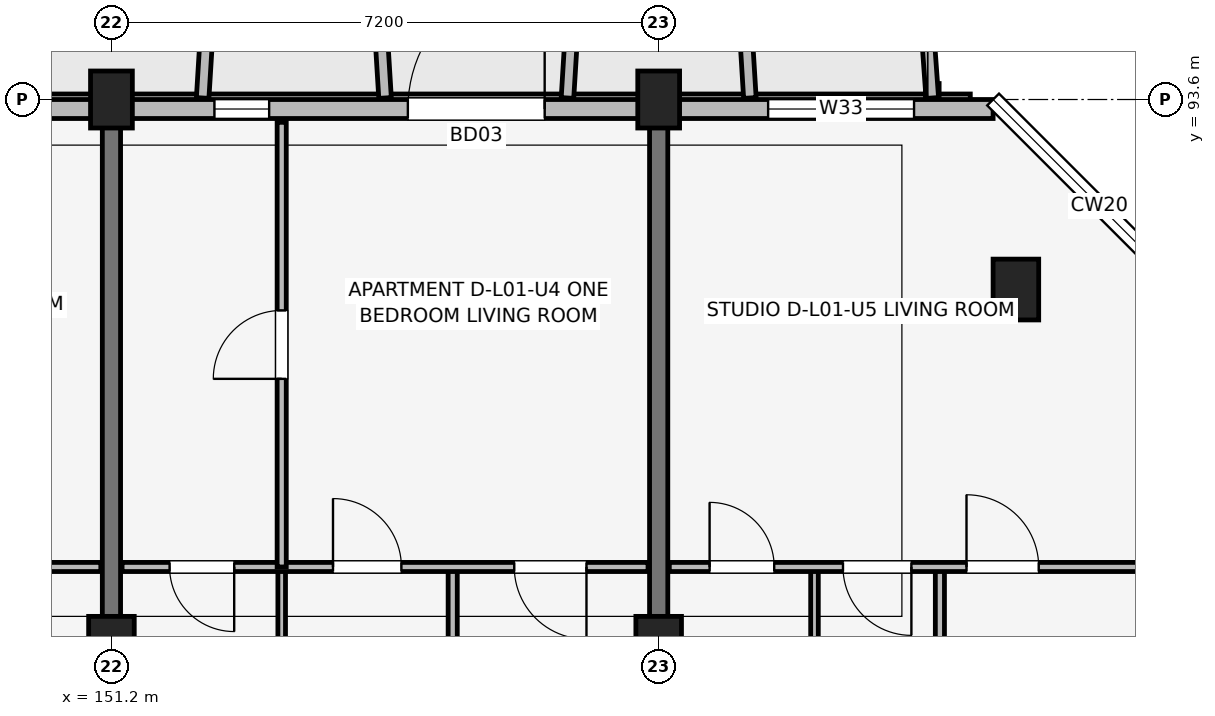
"""IFC4 building model, lengths in metres.
Left out: names, types, materials, properties, quantities, classifications, styles, units other than length and angle.
Written with IfcOpenShell. Run it as: python <this file> out.ifc"""

import sys

from ifc_helpers import new_model, si_unit, direction, frame, frame_2d, origin, origin_2d, place, context, subcontext, project, spatial, rectangle, extrude, element, fill, save


model = new_model("IFC4")
c1 = context("Model", 3, precision=1e-05, world=origin(), true_north=direction((0.0, 1.0)))
c2 = subcontext(c1, "Body", "Model", "MODEL_VIEW")
j1 = project(units=[si_unit("LENGTHUNIT", "METRE"), si_unit("PLANEANGLEUNIT", "RADIAN")], contexts=[c1])
p1 = place(None, origin())
s1 = spatial("IfcSite", under=j1, at=p1, CompositionType="ELEMENT")
p2 = place(p1, origin())
s2 = spatial("IfcBuilding", under=s1, at=p2, CompositionType="ELEMENT")
p3 = place(p2, frame((0.0, 0.0, 4.5)))
s3 = spatial("IfcBuildingStorey", under=s2, at=p3, CompositionType="ELEMENT", Elevation=4.5)
p4 = place(p3, frame((151.2, 86.4, 0.0), z_axis=(0.0, 0.0, 1.0), x_axis=(1.0, 0.0, 0.0)))
e1 = element("IfcColumn", 1, at=p4, inside=s3, PredefinedType="COLUMN", context=c2, shape_type="SweptSolid", body=[
    extrude(rectangle(XDim=0.6, YDim=0.8, at=origin_2d()), origin(), (0.0, 0.0, 1.0), 4.2),
])
p5 = place(p3, frame((151.2, 93.6, 0.0), z_axis=(0.0, 0.0, 1.0), x_axis=(1.0, 0.0, 0.0)))
e2 = element("IfcColumn", 2, at=p5, inside=s3, PredefinedType="COLUMN", context=c2, shape_type="SweptSolid", body=[
    extrude(rectangle(XDim=0.55, YDim=0.75, at=origin_2d()), origin(), (0.0, 0.0, 1.0), 4.2),
])
p6 = place(p3, frame((158.4, 86.4, 0.0), z_axis=(0.0, 0.0, 1.0), x_axis=(1.0, 0.0, 0.0)))
e3 = element("IfcColumn", 3, at=p6, inside=s3, PredefinedType="COLUMN", context=c2, shape_type="SweptSolid", body=[
    extrude(rectangle(XDim=0.6, YDim=0.8, at=origin_2d()), origin(), (0.0, 0.0, 1.0), 4.2),
])
p7 = place(p3, frame((158.4, 93.6, 0.0), z_axis=(0.0, 0.0, 1.0), x_axis=(1.0, 0.0, 0.0)))
e4 = element("IfcColumn", 4, at=p7, inside=s3, PredefinedType="COLUMN", context=c2, shape_type="SweptSolid", body=[
    extrude(rectangle(XDim=0.55, YDim=0.75, at=origin_2d()), origin(), (0.0, 0.0, 1.0), 4.2),
])
p8 = place(p3, frame((163.1, 91.1, 0.0), z_axis=(0.0, 0.0, 1.0), x_axis=(1.0, 0.0, 0.0)))
e5 = element("IfcColumn", 5, at=p8, inside=s3, PredefinedType="COLUMN", context=c2, shape_type="SweptSolid", body=[
    extrude(rectangle(XDim=0.6, YDim=0.8, at=origin_2d()), origin(), (0.0, 0.0, 1.0), 4.2),
])
for number, where, z_axis, x_axis in (
    (6, (151.2, 83.85, 0.0), (0.0, 0.0, 1.0), (0.0, 1.0, 0.0)),
    (7, (158.4, 83.85, 0.0), (0.0, 0.0, 1.0), (0.0, 1.0, 0.0)),
):
    element("IfcWall", number, at=place(p3, frame(where, z_axis=z_axis, x_axis=x_axis)), inside=s3, PredefinedType="SHEAR", context=c2, shape_type="SweptSolid", body=[
        extrude(rectangle(XDim=9.4, YDim=0.24, at=frame_2d((4.7, 0.0))), origin(), (0.0, 0.0, 1.0), 4.2),
    ])
p9 = place(p3, frame((162.8, 93.475, 0.0), z_axis=(0.0, 0.0, 1.0), x_axis=(-1.0, 0.0, 0.0)))
e8 = element("IfcWall", 8, at=p9, inside=s3, PredefinedType="SOLIDWALL", context=c2, shape_type="SweptSolid", body=[
    extrude(rectangle(XDim=30.4, YDim=0.25, at=frame_2d((15.2, 0.0))), origin(), (0.0, 0.0, 1.0), 3.48),
])
p10 = place(p9, frame((21.95, 0.0, 0.0), z_axis=(0.0, 0.0, 1.0), x_axis=(-1.0, 0.0, 0.0)))
e9 = element("IfcOpeningElement", 9, at=p10, cuts=e8, PredefinedType="OPENING", context=c2, shape_type="SweptSolid", body=[
    extrude(rectangle(XDim=1.5, YDim=2.15, at=frame_2d((0.75, 1.075))), frame((0.0, 0.135, 0.0), z_axis=(0.0, -1.0, 0.0), x_axis=(1.0, 0.0, 0.0)), (0.0, 0.0, 1.0), 0.27),
])
p11 = place(p9, frame((7.7, 0.0, 0.0), z_axis=(0.0, 0.0, 1.0), x_axis=(-1.0, 0.0, 0.0)))
e10 = element("IfcOpeningElement", 10, at=p11, cuts=e8, PredefinedType="OPENING", context=c2, shape_type="SweptSolid", body=[
    extrude(rectangle(XDim=1.8, YDim=2.15, at=frame_2d((0.9, 1.075))), frame((0.0, 0.135, 0.0), z_axis=(0.0, -1.0, 0.0), x_axis=(1.0, 0.0, 0.0)), (0.0, 0.0, 1.0), 0.27),
])
p12 = place(p9, frame((27.765, 0.0, 0.75)))
e11 = element("IfcOpeningElement", 11, at=p12, cuts=e8, PredefinedType="OPENING", context=c2, shape_type="SweptSolid", body=[
    extrude(rectangle(XDim=1.1, YDim=1.5, at=frame_2d((0.55, 0.75))), frame((0.0, 0.135, 0.0), z_axis=(0.0, -1.0, 0.0), x_axis=(1.0, 0.0, 0.0)), (0.0, 0.0, 1.0), 0.27),
])
p13 = place(p9, frame((23.925, 0.0, 0.75)))
e12 = element("IfcOpeningElement", 12, at=p13, cuts=e8, PredefinedType="OPENING", context=c2, shape_type="SweptSolid", body=[
    extrude(rectangle(XDim=0.72, YDim=1.35, at=frame_2d((0.36, 0.675))), frame((0.0, 0.135, 0.0), z_axis=(0.0, -1.0, 0.0), x_axis=(1.0, 0.0, 0.0)), (0.0, 0.0, 1.0), 0.27),
])
p14 = place(p9, frame((15.325, 0.0, 0.7)))
e13 = element("IfcOpeningElement", 13, at=p14, cuts=e8, PredefinedType="OPENING", context=c2, shape_type="SweptSolid", body=[
    extrude(rectangle(XDim=2.15, YDim=1.65, at=frame_2d((1.075, 0.825))), frame((0.0, 0.135, 0.0), z_axis=(0.0, -1.0, 0.0), x_axis=(1.0, 0.0, 0.0)), (0.0, 0.0, 1.0), 0.27),
])
p15 = place(p9, frame((9.525, 0.0, 0.75)))
e14 = element("IfcOpeningElement", 14, at=p15, cuts=e8, PredefinedType="OPENING", context=c2, shape_type="SweptSolid", body=[
    extrude(rectangle(XDim=0.72, YDim=1.35, at=frame_2d((0.36, 0.675))), frame((0.0, 0.135, 0.0), z_axis=(0.0, -1.0, 0.0), x_axis=(1.0, 0.0, 0.0)), (0.0, 0.0, 1.0), 0.27),
])
p16 = place(p9, frame((1.04, 0.0, 0.7)))
e15 = element("IfcOpeningElement", 15, at=p16, cuts=e8, PredefinedType="OPENING", context=c2, shape_type="SweptSolid", body=[
    extrude(rectangle(XDim=1.92, YDim=1.72, at=frame_2d((0.96, 0.86))), frame((0.0, 0.135, 0.0), z_axis=(0.0, -1.0, 0.0), x_axis=(1.0, 0.0, 0.0)), (0.0, 0.0, 1.0), 0.27),
])
for number, where, z_axis, x_axis in (
    (16, (152.4, 93.62, 0.0), (0.0, 0.0, 1.0), (0.061, 0.998, 0.0)),
    (17, (154.8, 93.62, 0.0), (0.0, 0.0, 1.0), (-0.061, 0.998, 0.0)),
    (18, (157.2, 93.62, 0.0), (0.0, 0.0, 1.0), (0.061, 0.998, 0.0)),
):
    element("IfcWall", number, at=place(p3, frame(where, z_axis=z_axis, x_axis=x_axis)), inside=s3, PredefinedType="ELEMENTEDWALL", context=c2, shape_type="SweptSolid", body=[
        extrude(rectangle(XDim=1.964, YDim=0.165, at=frame_2d((0.982, 0.0))), origin(), (0.0, 0.0, 1.0), 3.58),
    ])
p17 = place(p3, frame((159.6, 93.62, 0.0), z_axis=(0.0, 0.0, 1.0), x_axis=(-0.061170732449, 0.998127317276, 0.0)))
e19 = element("IfcWall", 19, at=p17, inside=s3, PredefinedType="ELEMENTEDWALL", context=c2, shape_type="SweptSolid", body=[
    extrude(rectangle(XDim=1.964, YDim=0.165, at=frame_2d((0.982, 0.0))), origin(), (0.0, 0.0, 1.0), 4.0),
])
p18 = place(p3, frame((162.0, 93.62, 0.0), z_axis=(0.0, 0.0, 1.0), x_axis=(-0.071194071069, 0.997462482625, 0.0)))
e20 = element("IfcWall", 20, at=p18, inside=s3, PredefinedType="ELEMENTEDWALL", context=c2, shape_type="SweptSolid", body=[
    extrude(rectangle(XDim=1.965, YDim=0.165, at=frame_2d((0.982, 0.0))), origin(), (0.0, 0.0, 1.0), 4.0),
])
p19 = place(p3, frame((144.14, 87.45, 0.0), z_axis=(0.0, 0.0, 1.0), x_axis=(1.0, 0.0, 0.0)))
e21 = element("IfcWall", 21, at=p19, inside=s3, PredefinedType="PARTITIONING", context=c2, shape_type="SweptSolid", body=[
    extrude(rectangle(XDim=6.92, YDim=0.12, at=frame_2d((3.46, 0.0))), origin(), (0.0, 0.0, 1.0), 3.25),
])
p20 = place(p19, frame((1.475, 0.0, 0.0), z_axis=(0.0, 0.0, 1.0), x_axis=(-1.0, 0.0, 0.0)))
e22 = element("IfcOpeningElement", 22, at=p20, cuts=e21, PredefinedType="OPENING", context=c2, shape_type="SweptSolid", body=[
    extrude(rectangle(XDim=0.85, YDim=2.08, at=frame_2d((0.425, 1.04))), frame((0.0, 0.07, 0.0), z_axis=(0.0, -1.0, 0.0), x_axis=(1.0, 0.0, 0.0)), (0.0, 0.0, 1.0), 0.14),
])
p21 = place(p19, frame((2.625, 0.0, 0.0)))
e23 = element("IfcOpeningElement", 23, at=p21, cuts=e21, PredefinedType="OPENING", context=c2, shape_type="SweptSolid", body=[
    extrude(rectangle(XDim=0.9, YDim=2.08, at=frame_2d((0.45, 1.04))), frame((0.0, 0.07, 0.0), z_axis=(0.0, -1.0, 0.0), x_axis=(1.0, 0.0, 0.0)), (0.0, 0.0, 1.0), 0.14),
])
p22 = place(p19, frame((5.96, 0.0, 0.0), z_axis=(0.0, 0.0, 1.0), x_axis=(-1.0, 0.0, 0.0)))
e24 = element("IfcOpeningElement", 24, at=p22, cuts=e21, PredefinedType="OPENING", context=c2, shape_type="SweptSolid", body=[
    extrude(rectangle(XDim=0.95, YDim=2.08, at=frame_2d((0.475, 1.04))), frame((0.0, 0.07, 0.0), z_axis=(0.0, -1.0, 0.0), x_axis=(1.0, 0.0, 0.0)), (0.0, 0.0, 1.0), 0.14),
])
p23 = place(p3, frame((153.44, 83.7, 0.0), z_axis=(0.0, 0.0, 1.0), x_axis=(0.0, 1.0, 0.0)))
e25 = element("IfcWall", 25, at=p23, inside=s3, PredefinedType="PARTITIONING", context=c2, shape_type="SweptSolid", body=[
    extrude(rectangle(XDim=3.75, YDim=0.1, at=frame_2d((1.875, 0.0))), origin(), (0.0, 0.0, 1.0), 3.25),
])
p24 = place(p3, frame((155.69, 83.7, 0.0), z_axis=(0.0, 0.0, 1.0), x_axis=(0.0, 1.0, 0.0)))
e26 = element("IfcWall", 26, at=p24, inside=s3, PredefinedType="PARTITIONING", context=c2, shape_type="SweptSolid", body=[
    extrude(rectangle(XDim=3.75, YDim=0.12, at=frame_2d((1.875, 0.0))), origin(), (0.0, 0.0, 1.0), 3.25),
])
p25 = place(p3, frame((151.34, 87.45, 0.0), z_axis=(0.0, 0.0, 1.0), x_axis=(1.0, 0.0, 0.0)))
e27 = element("IfcWall", 27, at=p25, inside=s3, PredefinedType="PARTITIONING", context=c2, shape_type="SweptSolid", body=[
    extrude(rectangle(XDim=6.92, YDim=0.12, at=frame_2d((3.46, 0.0))), origin(), (0.0, 0.0, 1.0), 3.25),
])
p26 = place(p25, frame((1.475, 0.0, 0.0), z_axis=(0.0, 0.0, 1.0), x_axis=(-1.0, 0.0, 0.0)))
e28 = element("IfcOpeningElement", 28, at=p26, cuts=e27, PredefinedType="OPENING", context=c2, shape_type="SweptSolid", body=[
    extrude(rectangle(XDim=0.85, YDim=2.08, at=frame_2d((0.425, 1.04))), frame((0.0, 0.07, 0.0), z_axis=(0.0, -1.0, 0.0), x_axis=(1.0, 0.0, 0.0)), (0.0, 0.0, 1.0), 0.14),
])
p27 = place(p25, frame((2.775, 0.0, 0.0)))
e29 = element("IfcOpeningElement", 29, at=p27, cuts=e27, PredefinedType="OPENING", context=c2, shape_type="SweptSolid", body=[
    extrude(rectangle(XDim=0.9, YDim=2.08, at=frame_2d((0.45, 1.04))), frame((0.0, 0.07, 0.0), z_axis=(0.0, -1.0, 0.0), x_axis=(1.0, 0.0, 0.0)), (0.0, 0.0, 1.0), 0.14),
])
p28 = place(p25, frame((6.11, 0.0, 0.0), z_axis=(0.0, 0.0, 1.0), x_axis=(-1.0, 0.0, 0.0)))
e30 = element("IfcOpeningElement", 30, at=p28, cuts=e27, PredefinedType="OPENING", context=c2, shape_type="SweptSolid", body=[
    extrude(rectangle(XDim=0.95, YDim=2.08, at=frame_2d((0.475, 1.04))), frame((0.0, 0.07, 0.0), z_axis=(0.0, -1.0, 0.0), x_axis=(1.0, 0.0, 0.0)), (0.0, 0.0, 1.0), 0.14),
])
p29 = place(p3, frame((153.44, 87.45, 0.0), z_axis=(0.0, 0.0, 1.0), x_axis=(0.0, 1.0, 0.0)))
e31 = element("IfcWall", 31, at=p29, inside=s3, PredefinedType="PARTITIONING", context=c2, shape_type="SweptSolid", body=[
    extrude(rectangle(XDim=5.85, YDim=0.12, at=frame_2d((2.925, 0.0))), origin(), (0.0, 0.0, 1.0), 3.25),
])
p30 = place(p29, frame((2.475, 0.0, 0.0)))
e32 = element("IfcOpeningElement", 32, at=p30, cuts=e31, PredefinedType="OPENING", context=c2, shape_type="SweptSolid", body=[
    extrude(rectangle(XDim=0.9, YDim=2.08, at=frame_2d((0.45, 1.04))), frame((0.0, 0.07, 0.0), z_axis=(0.0, -1.0, 0.0), x_axis=(1.0, 0.0, 0.0)), (0.0, 0.0, 1.0), 0.14),
])
p31 = place(p3, frame((160.45, 83.7, 0.0), z_axis=(0.0, 0.0, 1.0), x_axis=(0.0, 1.0, 0.0)))
e33 = element("IfcWall", 33, at=p31, inside=s3, PredefinedType="PARTITIONING", context=c2, shape_type="SweptSolid", body=[
    extrude(rectangle(XDim=3.75, YDim=0.1, at=frame_2d((1.875, 0.0))), origin(), (0.0, 0.0, 1.0), 3.25),
])
p32 = place(p3, frame((162.1, 83.7, 0.0), z_axis=(0.0, 0.0, 1.0), x_axis=(0.0, 1.0, 0.0)))
e34 = element("IfcWall", 34, at=p32, inside=s3, PredefinedType="PARTITIONING", context=c2, shape_type="SweptSolid", body=[
    extrude(rectangle(XDim=3.75, YDim=0.12, at=frame_2d((1.875, 0.0))), origin(), (0.0, 0.0, 1.0), 3.25),
])
p33 = place(p3, frame((158.54, 87.45, 0.0), z_axis=(0.0, 0.0, 1.0), x_axis=(1.0, 0.0, 0.0)))
e35 = element("IfcWall", 35, at=p33, inside=s3, PredefinedType="PARTITIONING", context=c2, shape_type="SweptSolid", body=[
    extrude(rectangle(XDim=6.92, YDim=0.12, at=frame_2d((3.46, 0.0))), origin(), (0.0, 0.0, 1.0), 3.25),
])
p34 = place(p33, frame((0.53, 0.0, 0.0)))
e36 = element("IfcOpeningElement", 36, at=p34, cuts=e35, PredefinedType="OPENING", context=c2, shape_type="SweptSolid", body=[
    extrude(rectangle(XDim=0.85, YDim=2.08, at=frame_2d((0.425, 1.04))), frame((0.0, 0.07, 0.0), z_axis=(0.0, -1.0, 0.0), x_axis=(1.0, 0.0, 0.0)), (0.0, 0.0, 1.0), 0.14),
])
p35 = place(p33, frame((3.185, 0.0, 0.0), z_axis=(0.0, 0.0, 1.0), x_axis=(-1.0, 0.0, 0.0)))
e37 = element("IfcOpeningElement", 37, at=p35, cuts=e35, PredefinedType="OPENING", context=c2, shape_type="SweptSolid", body=[
    extrude(rectangle(XDim=0.9, YDim=2.08, at=frame_2d((0.45, 1.04))), frame((0.0, 0.07, 0.0), z_axis=(0.0, -1.0, 0.0), x_axis=(1.0, 0.0, 0.0)), (0.0, 0.0, 1.0), 0.14),
])
p36 = place(p33, frame((3.91, 0.0, 0.0)))
e38 = element("IfcOpeningElement", 38, at=p36, cuts=e35, PredefinedType="OPENING", context=c2, shape_type="SweptSolid", body=[
    extrude(rectangle(XDim=0.95, YDim=2.08, at=frame_2d((0.475, 1.04))), frame((0.0, 0.07, 0.0), z_axis=(0.0, -1.0, 0.0), x_axis=(1.0, 0.0, 0.0)), (0.0, 0.0, 1.0), 0.14),
])
p37 = place(p11, origin())
e39 = element("IfcDoor", 39, at=p37, inside=s3, OperationType="SINGLE_SWING_LEFT", PredefinedType="DOOR", context=c2, shape_type="SweptSolid", body=[
    extrude(rectangle(XDim=1.8, YDim=2.15, at=frame_2d((0.9, 1.075))), frame((0.0, 0.025, 0.0), z_axis=(0.0, -1.0, 0.0), x_axis=(1.0, 0.0, 0.0)), (0.0, 0.0, 1.0), 0.05),
])
fill(e10, e39)
p38 = place(p15, origin())
e40 = element("IfcWindow", 40, at=p38, inside=s3, PartitioningType="SINGLE_PANEL", PredefinedType="WINDOW", context=c2, shape_type="SweptSolid", body=[
    extrude(rectangle(XDim=0.72, YDim=1.35, at=frame_2d((0.36, 0.675))), frame((0.0, 0.03, 0.0), z_axis=(0.0, -1.0, 0.0), x_axis=(1.0, 0.0, 0.0)), (0.0, 0.0, 1.0), 0.06),
])
fill(e14, e40)
p39 = place(p16, origin())
e41 = element("IfcWindow", 41, at=p39, inside=s3, PartitioningType="SINGLE_PANEL", PredefinedType="WINDOW", context=c2, shape_type="SweptSolid", body=[
    extrude(rectangle(XDim=1.92, YDim=1.72, at=frame_2d((0.96, 0.86))), frame((0.0, 0.03, 0.0), z_axis=(0.0, -1.0, 0.0), x_axis=(1.0, 0.0, 0.0)), (0.0, 0.0, 1.0), 0.06),
])
fill(e15, e41)
p40 = place(p26, origin())
e42 = element("IfcDoor", 42, at=p40, inside=s3, OperationType="SINGLE_SWING_RIGHT", PredefinedType="DOOR", context=c2, shape_type="SweptSolid", body=[
    extrude(rectangle(XDim=0.85, YDim=2.08, at=frame_2d((0.425, 1.04))), frame((0.0, 0.025, 0.0), z_axis=(0.0, -1.0, 0.0), x_axis=(1.0, 0.0, 0.0)), (0.0, 0.0, 1.0), 0.05),
])
fill(e28, e42)
p41 = place(p27, origin())
e43 = element("IfcDoor", 43, at=p41, inside=s3, OperationType="SINGLE_SWING_LEFT", PredefinedType="DOOR", context=c2, shape_type="SweptSolid", body=[
    extrude(rectangle(XDim=0.9, YDim=2.08, at=frame_2d((0.45, 1.04))), frame((0.0, 0.025, 0.0), z_axis=(0.0, -1.0, 0.0), x_axis=(1.0, 0.0, 0.0)), (0.0, 0.0, 1.0), 0.05),
])
fill(e29, e43)
p42 = place(p28, origin())
e44 = element("IfcDoor", 44, at=p42, inside=s3, OperationType="SINGLE_SWING_RIGHT", PredefinedType="DOOR", context=c2, shape_type="SweptSolid", body=[
    extrude(rectangle(XDim=0.95, YDim=2.08, at=frame_2d((0.475, 1.04))), frame((0.0, 0.025, 0.0), z_axis=(0.0, -1.0, 0.0), x_axis=(1.0, 0.0, 0.0)), (0.0, 0.0, 1.0), 0.05),
])
fill(e30, e44)
p43 = place(p30, origin())
e45 = element("IfcDoor", 45, at=p43, inside=s3, OperationType="SINGLE_SWING_LEFT", PredefinedType="DOOR", context=c2, shape_type="SweptSolid", body=[
    extrude(rectangle(XDim=0.9, YDim=2.08, at=frame_2d((0.45, 1.04))), frame((0.0, 0.025, 0.0), z_axis=(0.0, -1.0, 0.0), x_axis=(1.0, 0.0, 0.0)), (0.0, 0.0, 1.0), 0.05),
])
fill(e32, e45)
p44 = place(p34, origin())
e46 = element("IfcDoor", 46, at=p44, inside=s3, OperationType="SINGLE_SWING_LEFT", PredefinedType="DOOR", context=c2, shape_type="SweptSolid", body=[
    extrude(rectangle(XDim=0.85, YDim=2.08, at=frame_2d((0.425, 1.04))), frame((0.0, 0.025, 0.0), z_axis=(0.0, -1.0, 0.0), x_axis=(1.0, 0.0, 0.0)), (0.0, 0.0, 1.0), 0.05),
])
fill(e36, e46)
p45 = place(p35, origin())
e47 = element("IfcDoor", 47, at=p45, inside=s3, OperationType="SINGLE_SWING_RIGHT", PredefinedType="DOOR", context=c2, shape_type="SweptSolid", body=[
    extrude(rectangle(XDim=0.9, YDim=2.08, at=frame_2d((0.45, 1.04))), frame((0.0, 0.025, 0.0), z_axis=(0.0, -1.0, 0.0), x_axis=(1.0, 0.0, 0.0)), (0.0, 0.0, 1.0), 0.05),
])
fill(e37, e47)
p46 = place(p36, origin())
e48 = element("IfcDoor", 48, at=p46, inside=s3, OperationType="SINGLE_SWING_LEFT", PredefinedType="DOOR", context=c2, shape_type="SweptSolid", body=[
    extrude(rectangle(XDim=0.95, YDim=2.08, at=frame_2d((0.475, 1.04))), frame((0.0, 0.025, 0.0), z_axis=(0.0, -1.0, 0.0), x_axis=(1.0, 0.0, 0.0)), (0.0, 0.0, 1.0), 0.05),
])
fill(e38, e48)
save(model, sys.argv[1])
